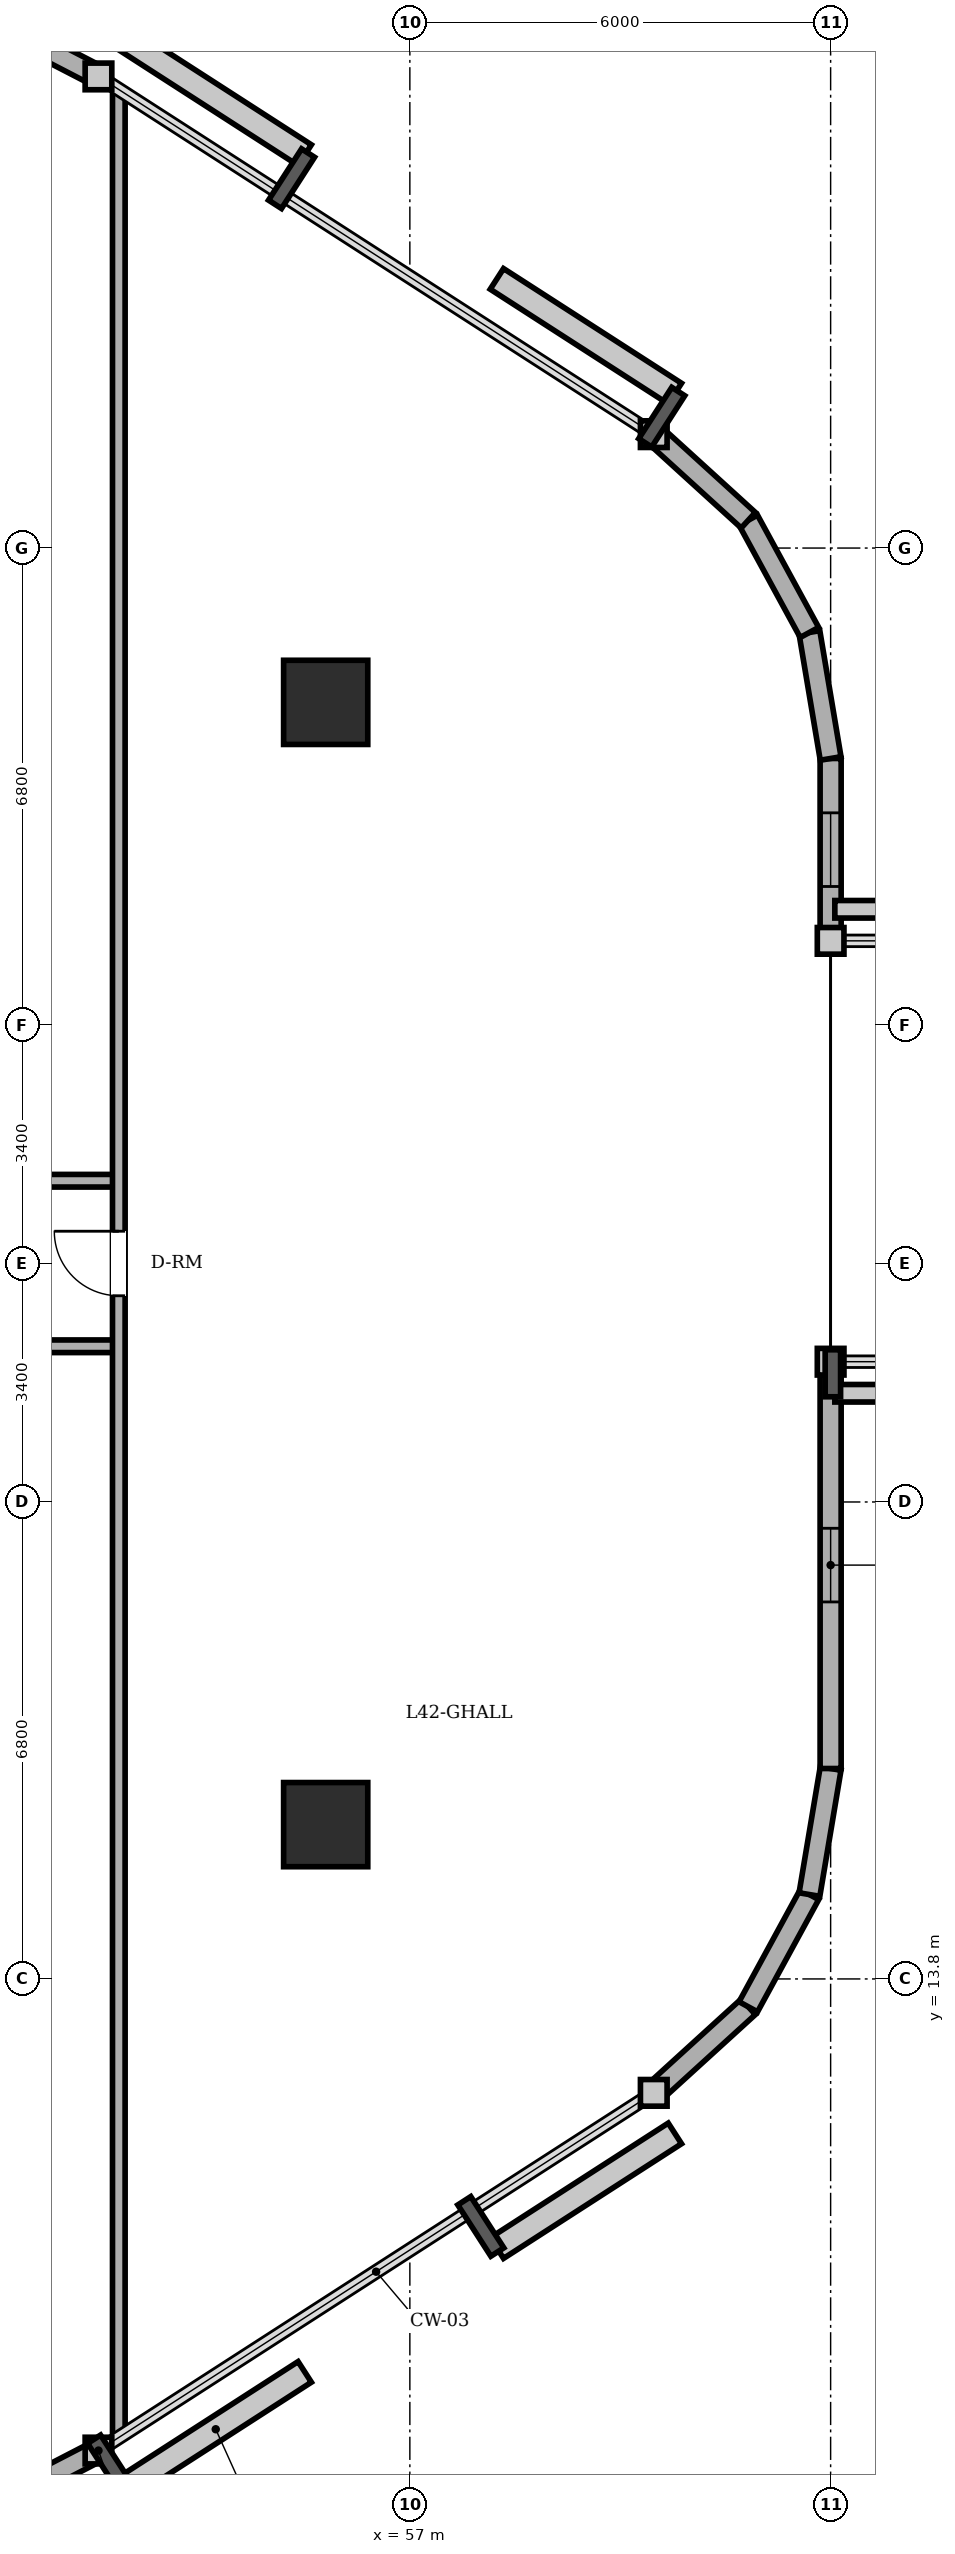
"""IFC4 building model, lengths in metres.
Left out: names, types, materials, properties, quantities, classifications, styles, units other than length and angle.
Written with IfcOpenShell. Run it as: python <this file> out.ifc"""

import sys

from ifc_helpers import new_model, si_unit, direction, frame, frame_2d, origin, origin_2d, place, context, subcontext, project, spatial, rectangle, circle, extrude, element, fill, save


model = new_model("IFC4")
c1 = context("Model", 3, precision=1e-05, world=origin(), true_north=direction((0.0, 1.0)))
c2 = subcontext(c1, "Body", "Model", "MODEL_VIEW")
j1 = project(units=[si_unit("LENGTHUNIT", "METRE"), si_unit("PLANEANGLEUNIT", "RADIAN")], contexts=[c1])
p1 = place(None, origin())
s1 = spatial("IfcSite", under=j1, at=p1, CompositionType="ELEMENT")
p2 = place(p1, origin())
s2 = spatial("IfcBuilding", under=s1, at=p2, CompositionType="ELEMENT")
p3 = place(p2, frame((0.0, 0.0, 161.8)))
s3 = spatial("IfcBuildingStorey", under=s2, at=p3, CompositionType="ELEMENT", Elevation=161.8)
for number, where, z_axis, x_axis in (
    (1, (55.8, 16.0, 0.0), (0.0, 0.0, 1.0), (1.0, 0.0, 0.0)),
    (2, (55.8, 32.0, 0.0), (0.0, 0.0, 1.0), (1.0, 0.0, 0.0)),
):
    element("IfcColumn", number, at=place(p3, frame(where, z_axis=z_axis, x_axis=x_axis)), inside=s3, PredefinedType="COLUMN", context=c2, shape_type="SweptSolid", body=[
        extrude(circle(Radius=0.6, at=origin_2d()), origin(), (0.0, 0.0, 1.0), 3.6),
    ])
p4 = place(p3, frame((51.63, 6.595, 0.0), z_axis=(0.0, 0.0, 1.0), x_axis=(0.888283247196, 0.459296062198, 0.0)))
e3 = element("IfcWall", 3, at=p4, inside=s3, PredefinedType="SOLIDWALL", context=c2, shape_type="SweptSolid", body=[
    extrude(rectangle(XDim=1.047, YDim=0.3, at=frame_2d((0.523, 0.0))), origin(), (0.0, 0.0, 1.0), 3.4),
])
p5 = place(p3, frame((60.478, 12.176, 0.0), z_axis=(0.0, 0.0, 1.0), x_axis=(0.73947929393, 0.673179302897, 0.0)))
e4 = element("IfcWall", 4, at=p5, inside=s3, PredefinedType="SOLIDWALL", context=c2, shape_type="SweptSolid", body=[
    extrude(rectangle(XDim=1.823, YDim=0.3, at=frame_2d((0.911, 0.0))), origin(), (0.0, 0.0, 1.0), 3.4),
])
p6 = place(p3, frame((61.826, 13.403, 0.0), z_axis=(0.0, 0.0, 1.0), x_axis=(0.478608030646, 0.878028674362, 0.0)))
e5 = element("IfcWall", 5, at=p6, inside=s3, PredefinedType="SOLIDWALL", context=c2, shape_type="SweptSolid", body=[
    extrude(rectangle(XDim=1.822, YDim=0.3, at=frame_2d((0.911, 0.0))), origin(), (0.0, 0.0, 1.0), 3.4),
])
p7 = place(p3, frame((62.698, 15.003, 0.0), z_axis=(0.0, 0.0, 1.0), x_axis=(0.165724081207, 0.986172159873, 0.0)))
e6 = element("IfcWall", 6, at=p7, inside=s3, PredefinedType="SOLIDWALL", context=c2, shape_type="SweptSolid", body=[
    extrude(rectangle(XDim=1.822, YDim=0.3, at=frame_2d((0.911, 0.0))), origin(), (0.0, 0.0, 1.0), 3.4),
])
p8 = place(p3, frame((63.0, 16.8, 0.0), z_axis=(0.0, 0.0, 1.0), x_axis=(0.0, 1.0, 0.0)))
e7 = element("IfcWall", 7, at=p8, inside=s3, PredefinedType="SOLIDWALL", context=c2, shape_type="SweptSolid", body=[
    extrude(rectangle(XDim=5.8, YDim=0.3, at=frame_2d((2.9, 0.0))), origin(), (0.0, 0.0, 1.0), 3.4),
])
p9 = place(p8, frame((2.375, 0.0, 0.85)))
e8 = element("IfcOpeningElement", 8, at=p9, cuts=e7, PredefinedType="OPENING", context=c2, shape_type="SweptSolid", body=[
    extrude(rectangle(XDim=1.05, YDim=1.55, at=frame_2d((0.525, 0.775))), frame((0.0, 0.16, 0.0), z_axis=(0.0, -1.0, 0.0), x_axis=(1.0, 0.0, 0.0)), (0.0, 0.0, 1.0), 0.32),
])
p10 = place(p3, frame((63.0, 28.6, 0.0), z_axis=(0.0, 0.0, 1.0), x_axis=(0.0, 1.0, 0.0)))
e9 = element("IfcWall", 9, at=p10, inside=s3, PredefinedType="SOLIDWALL", context=c2, shape_type="SweptSolid", body=[
    extrude(rectangle(XDim=2.6, YDim=0.3, at=frame_2d((1.3, 0.0))), origin(), (0.0, 0.0, 1.0), 3.4),
])
p11 = place(p10, frame((0.775, 0.0, 0.85)))
e10 = element("IfcOpeningElement", 10, at=p11, cuts=e9, PredefinedType="OPENING", context=c2, shape_type="SweptSolid", body=[
    extrude(rectangle(XDim=1.05, YDim=1.55, at=frame_2d((0.525, 0.775))), frame((0.0, 0.16, 0.0), z_axis=(0.0, -1.0, 0.0), x_axis=(1.0, 0.0, 0.0)), (0.0, 0.0, 1.0), 0.32),
])
p12 = place(p3, frame((63.0, 31.2, 0.0), z_axis=(0.0, 0.0, 1.0), x_axis=(-0.165724081207, 0.986172159873, 0.0)))
e11 = element("IfcWall", 11, at=p12, inside=s3, PredefinedType="SOLIDWALL", context=c2, shape_type="SweptSolid", body=[
    extrude(rectangle(XDim=1.822, YDim=0.3, at=frame_2d((0.911, 0.0))), origin(), (0.0, 0.0, 1.0), 3.4),
])
p13 = place(p3, frame((62.698, 32.997, 0.0), z_axis=(0.0, 0.0, 1.0), x_axis=(-0.478608030646, 0.878028674362, 0.0)))
e12 = element("IfcWall", 12, at=p13, inside=s3, PredefinedType="SOLIDWALL", context=c2, shape_type="SweptSolid", body=[
    extrude(rectangle(XDim=1.822, YDim=0.3, at=frame_2d((0.911, 0.0))), origin(), (0.0, 0.0, 1.0), 3.4),
])
p14 = place(p3, frame((61.826, 34.597, 0.0), z_axis=(0.0, 0.0, 1.0), x_axis=(-0.73947929393, 0.673179302897, 0.0)))
e13 = element("IfcWall", 13, at=p14, inside=s3, PredefinedType="SOLIDWALL", context=c2, shape_type="SweptSolid", body=[
    extrude(rectangle(XDim=1.823, YDim=0.3, at=frame_2d((0.911, 0.0))), origin(), (0.0, 0.0, 1.0), 3.4),
])
p15 = place(p3, frame((52.56, 40.924, 0.0), z_axis=(0.0, 0.0, 1.0), x_axis=(-0.888283247196, 0.459296062198, 0.0)))
e14 = element("IfcWall", 14, at=p15, inside=s3, PredefinedType="SOLIDWALL", context=c2, shape_type="SweptSolid", body=[
    extrude(rectangle(XDim=1.047, YDim=0.3, at=frame_2d((0.523, 0.0))), origin(), (0.0, 0.0, 1.0), 3.4),
])
for number, where, z_axis, x_axis in (
    (15, (41.75, 22.82, 0.0), (0.0, 0.0, 1.0), (1.0, 0.0, 0.0)),
    (16, (41.75, 25.18, 0.0), (0.0, 0.0, 1.0), (1.0, 0.0, 0.0)),
):
    element("IfcWall", number, at=place(p3, frame(where, z_axis=z_axis, x_axis=x_axis)), inside=s3, PredefinedType="PARTITIONING", context=c2, shape_type="SweptSolid", body=[
        extrude(rectangle(XDim=11.1, YDim=0.18, at=frame_2d((5.55, 0.0))), origin(), (0.0, 0.0, 1.0), 3.4),
    ])
p16 = place(p3, frame((52.85, 7.263, 0.0), z_axis=(0.0, 0.0, 1.0), x_axis=(0.0, 1.0, 0.0)))
e17 = element("IfcWall", 17, at=p16, inside=s3, PredefinedType="PARTITIONING", context=c2, shape_type="SweptSolid", body=[
    extrude(rectangle(XDim=33.474, YDim=0.18, at=frame_2d((16.737, 0.0))), origin(), (0.0, 0.0, 1.0), 3.4),
])
p17 = place(p16, frame((16.277, 0.0, 0.0)))
e18 = element("IfcOpeningElement", 18, at=p17, cuts=e17, PredefinedType="OPENING", context=c2, shape_type="SweptSolid", body=[
    extrude(rectangle(XDim=0.92, YDim=2.1, at=frame_2d((0.46, 1.05))), frame((0.0, 0.1, 0.0), z_axis=(0.0, -1.0, 0.0), x_axis=(1.0, 0.0, 0.0)), (0.0, 0.0, 1.0), 0.2),
])
p18 = place(p9, origin())
e19 = element("IfcWindow", 19, at=p18, inside=s3, PartitioningType="SINGLE_PANEL", PredefinedType="WINDOW", context=c2, shape_type="SweptSolid", body=[
    extrude(rectangle(XDim=1.05, YDim=1.55, at=frame_2d((0.525, 0.775))), frame((0.0, 0.03, 0.0), z_axis=(0.0, -1.0, 0.0), x_axis=(1.0, 0.0, 0.0)), (0.0, 0.0, 1.0), 0.06),
])
fill(e8, e19)
p19 = place(p11, origin())
e20 = element("IfcWindow", 20, at=p19, inside=s3, PartitioningType="SINGLE_PANEL", PredefinedType="WINDOW", context=c2, shape_type="SweptSolid", body=[
    extrude(rectangle(XDim=1.05, YDim=1.55, at=frame_2d((0.525, 0.775))), frame((0.0, 0.03, 0.0), z_axis=(0.0, -1.0, 0.0), x_axis=(1.0, 0.0, 0.0)), (0.0, 0.0, 1.0), 0.06),
])
fill(e10, e20)
p20 = place(p17, origin())
e21 = element("IfcDoor", 21, at=p20, inside=s3, OperationType="SINGLE_SWING_RIGHT", PredefinedType="DOOR", context=c2, shape_type="SweptSolid", body=[
    extrude(rectangle(XDim=0.92, YDim=2.1, at=frame_2d((0.46, 1.05))), frame((0.0, 0.025, 0.0), z_axis=(0.0, -1.0, 0.0), x_axis=(1.0, 0.0, 0.0)), (0.0, 0.0, 1.0), 0.05),
])
fill(e18, e21)
save(model, sys.argv[1])
